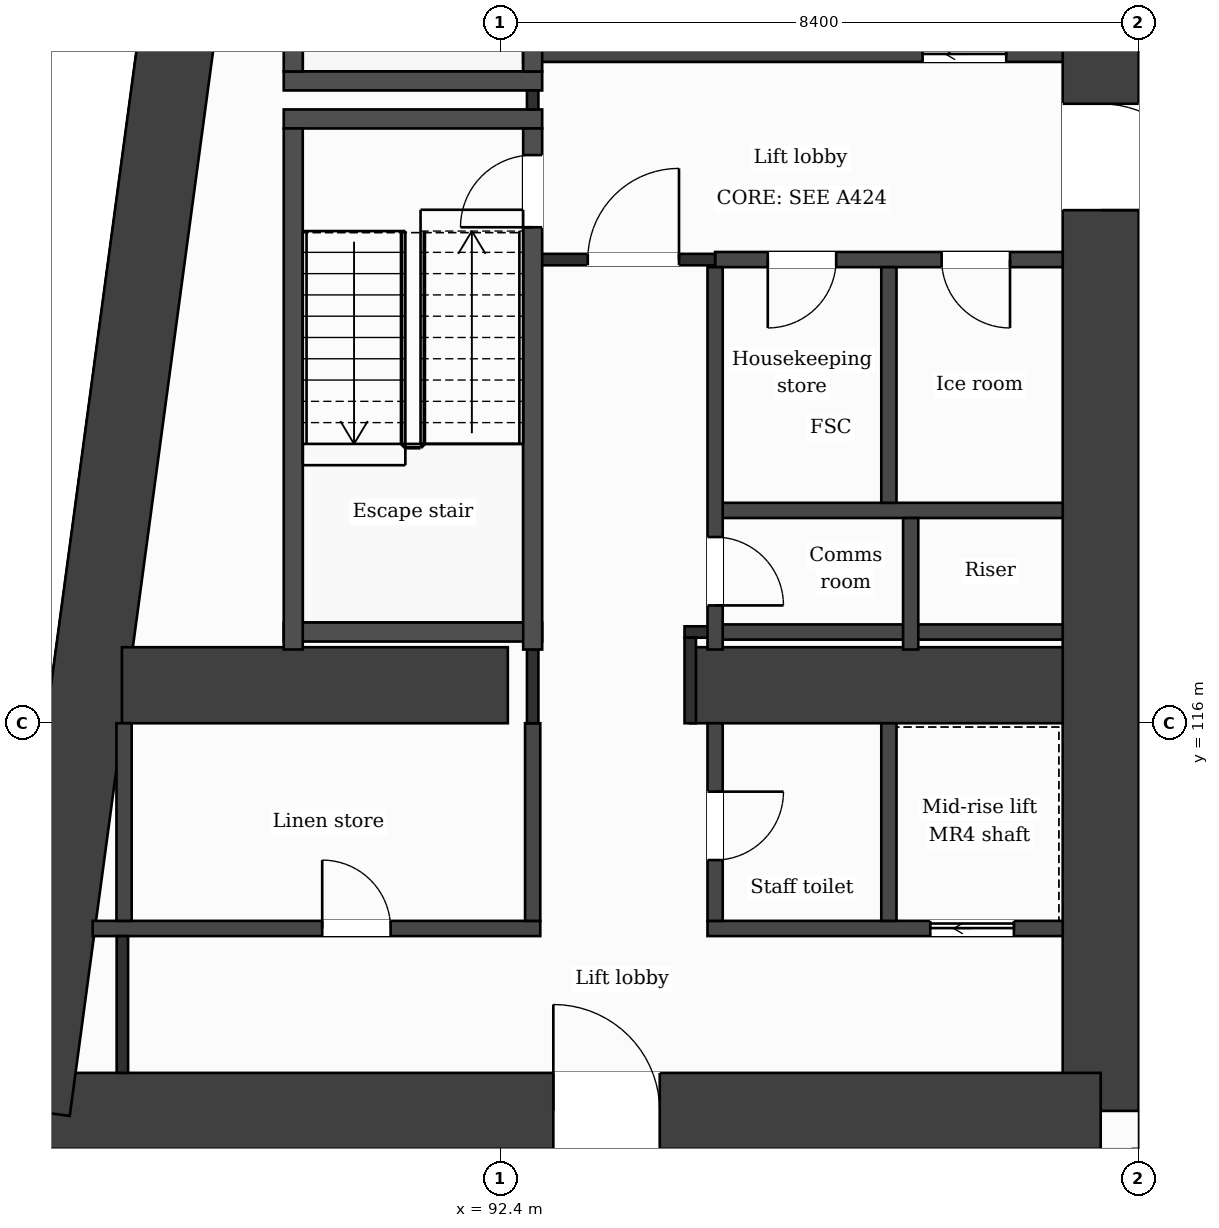
"""IFC4 building model, lengths in metres.
Left out: names, types, materials, properties, quantities, classifications, styles, units other than length and angle.
Written with IfcOpenShell. Run it as: python <this file> out.ifc"""

import sys

from ifc_helpers import new_model, si_unit, direction, frame, frame_2d, origin, place, context, subcontext, project, spatial, rectangle, extrude, element, fill, save


model = new_model("IFC4")
c1 = context("Model", 3, precision=1e-05, world=origin(), true_north=direction((0.0, 1.0)))
c2 = subcontext(c1, "Body", "Model", "MODEL_VIEW")
j1 = project(units=[si_unit("LENGTHUNIT", "METRE"), si_unit("PLANEANGLEUNIT", "RADIAN")], contexts=[c1])
p1 = place(None, origin())
s1 = spatial("IfcSite", under=j1, at=p1, CompositionType="ELEMENT")
p2 = place(p1, origin())
s2 = spatial("IfcBuilding", under=s1, at=p2, CompositionType="ELEMENT")
p3 = place(p2, frame((0.0, 0.0, 102.1)))
s3 = spatial("IfcBuildingStorey", under=s2, at=p3, CompositionType="ELEMENT", Elevation=102.1)
p4 = place(p3, frame((100.3, 131.9, 0.0), z_axis=(0.0, 0.0, 1.0), x_axis=(0.0, -1.0, 0.0)))
e1 = element("IfcWall", 1, at=p4, inside=s3, PredefinedType="SHEAR", context=c2, shape_type="SweptSolid", body=[
    extrude(rectangle(XDim=21.0, YDim=1.0, at=frame_2d((10.5, 0.0))), origin(), (0.0, 0.0, 1.0), 3.7),
])
p5 = place(p4, frame((7.75, 0.0, 0.0)))
e2 = element("IfcOpeningElement", 2, at=p5, cuts=e1, PredefinedType="OPENING", context=c2, shape_type="SweptSolid", body=[
    extrude(rectangle(XDim=1.4, YDim=2.1, at=frame_2d((0.7, 1.05))), frame((0.0, 0.51, 0.0), z_axis=(0.0, -1.0, 0.0), x_axis=(1.0, 0.0, 0.0)), (0.0, 0.0, 1.0), 1.02),
])
p6 = place(p3, frame((100.3, 110.9, 0.0), z_axis=(0.0, 0.0, 1.0), x_axis=(-1.0, 0.0, 0.0)))
e3 = element("IfcWall", 3, at=p6, inside=s3, PredefinedType="SHEAR", context=c2, shape_type="SweptSolid", body=[
    extrude(rectangle(XDim=14.059, YDim=1.0, at=frame_2d((7.03, 0.0))), origin(), (0.0, 0.0, 1.0), 3.7),
])
p7 = place(p6, frame((5.802, 0.0, 0.0)))
e4 = element("IfcOpeningElement", 4, at=p7, cuts=e3, PredefinedType="OPENING", context=c2, shape_type="SweptSolid", body=[
    extrude(rectangle(XDim=1.4, YDim=2.1, at=frame_2d((0.7, 1.05))), frame((0.0, 0.51, 0.0), z_axis=(0.0, -1.0, 0.0), x_axis=(1.0, 0.0, 0.0)), (0.0, 0.0, 1.0), 1.02),
])
p8 = place(p3, frame((86.241, 110.9, 0.0), z_axis=(0.0, 0.0, 1.0), x_axis=(0.133411141623, 0.991060778808, 0.0)))
e5 = element("IfcWall", 5, at=p8, inside=s3, PredefinedType="SHEAR", context=c2, shape_type="SweptSolid", body=[
    extrude(rectangle(XDim=21.189, YDim=1.0, at=frame_2d((10.595, 0.0))), origin(), (0.0, 0.0, 1.0), 3.7),
])
p9 = place(p3, frame((87.423, 116.5, 0.0), z_axis=(0.0, 0.0, 1.0), x_axis=(1.0, 0.0, 0.0)))
e6 = element("IfcWall", 6, at=p9, inside=s3, PredefinedType="SHEAR", context=c2, shape_type="SweptSolid", body=[
    extrude(rectangle(XDim=5.077, YDim=1.0, at=frame_2d((2.539, 0.0))), origin(), (0.0, 0.0, 1.0), 3.7),
])
p10 = place(p3, frame((94.9, 116.5, 0.0), z_axis=(0.0, 0.0, 1.0), x_axis=(1.0, 0.0, 0.0)))
e7 = element("IfcWall", 7, at=p10, inside=s3, PredefinedType="SHEAR", context=c2, shape_type="SweptSolid", body=[
    extrude(rectangle(XDim=4.9, YDim=1.0, at=frame_2d((2.45, 0.0))), origin(), (0.0, 0.0, 1.0), 3.7),
])
p11 = place(p3, frame((87.334, 110.4, 0.0), z_axis=(0.0, 0.0, 1.0), x_axis=(-0.133437175554, -0.991057273915, 0.0)))
e8 = element("IfcWall", 8, at=p11, inside=s3, PredefinedType="SOLIDWALL", context=c2, shape_type="SweptSolid", body=[
    extrude(rectangle(XDim=6.781, YDim=0.3, at=frame_2d((3.39, 0.0))), origin(), (0.0, 0.0, 1.0), 3.38),
])
p12 = place(p11, frame((1.418, 0.0, 0.0)))
e9 = element("IfcOpeningElement", 9, at=p12, cuts=e8, PredefinedType="OPENING", context=c2, shape_type="SweptSolid", body=[
    extrude(rectangle(XDim=1.2, YDim=2.4, at=frame_2d((0.6, 1.2))), frame((0.0, 0.16, 0.0), z_axis=(0.0, -1.0, 0.0), x_axis=(1.0, 0.0, 0.0)), (0.0, 0.0, 1.0), 0.32),
])
p13 = place(p11, frame((4.758, 0.0, 0.9)))
e10 = element("IfcOpeningElement", 10, at=p13, cuts=e8, PredefinedType="OPENING", context=c2, shape_type="SweptSolid", body=[
    extrude(rectangle(XDim=1.2, YDim=2.1, at=frame_2d((0.6, 1.05))), frame((0.0, 0.16, 0.0), z_axis=(0.0, -1.0, 0.0), x_axis=(1.0, 0.0, 0.0)), (0.0, 0.0, 1.0), 0.32),
])
p14 = place(p3, frame((87.039, 113.3, 0.0), z_axis=(0.0, 0.0, 1.0), x_axis=(1.0, 0.0, 0.0)))
e11 = element("IfcWall", 11, at=p14, inside=s3, PredefinedType="PARTITIONING", context=c2, shape_type="SweptSolid", body=[
    extrude(rectangle(XDim=5.888, YDim=0.2, at=frame_2d((2.944, 0.0))), origin(), (0.0, 0.0, 1.0), 3.38),
])
p15 = place(p14, frame((3.019, 0.0, 0.0)))
e12 = element("IfcOpeningElement", 12, at=p15, cuts=e11, PredefinedType="OPENING", context=c2, shape_type="SweptSolid", body=[
    extrude(rectangle(XDim=0.9, YDim=2.1, at=frame_2d((0.45, 1.05))), frame((0.0, 0.11, 0.0), z_axis=(0.0, -1.0, 0.0), x_axis=(1.0, 0.0, 0.0)), (0.0, 0.0, 1.0), 0.22),
])
p16 = place(p3, frame((95.127, 113.3, 0.0), z_axis=(0.0, 0.0, 1.0), x_axis=(1.0, 0.0, 0.0)))
e13 = element("IfcWall", 13, at=p16, inside=s3, PredefinedType="PARTITIONING", context=c2, shape_type="SweptSolid", body=[
    extrude(rectangle(XDim=4.673, YDim=0.2, at=frame_2d((2.336, 0.0))), origin(), (0.0, 0.0, 1.0), 3.38),
])
p17 = place(p16, frame((2.931, 0.0, 0.0)))
e14 = element("IfcOpeningElement", 14, at=p17, cuts=e13, PredefinedType="OPENING", context=c2, shape_type="SweptSolid", body=[
    extrude(rectangle(XDim=1.1, YDim=2.1, at=frame_2d((0.55, 1.05))), frame((0.0, 0.11, 0.0), z_axis=(0.0, -1.0, 0.0), x_axis=(1.0, 0.0, 0.0)), (0.0, 0.0, 1.0), 0.22),
])
p18 = place(p3, frame((95.227, 117.2, 0.0), z_axis=(0.0, 0.0, 1.0), x_axis=(1.0, 0.0, 0.0)))
e15 = element("IfcWall", 15, at=p18, inside=s3, PredefinedType="PARTITIONING", context=c2, shape_type="SweptSolid", body=[
    extrude(rectangle(XDim=4.573, YDim=0.2, at=frame_2d((2.287, 0.0))), origin(), (0.0, 0.0, 1.0), 3.38),
])
p19 = place(p3, frame((94.825, 117.2, 0.0), z_axis=(0.0, 0.0, 1.0), x_axis=(1.0, 0.0, 0.0)))
e16 = element("IfcWall", 16, at=p19, inside=s3, PredefinedType="PARTITIONING", context=c2, shape_type="SweptSolid", body=[
    extrude(rectangle(XDim=0.402, YDim=0.15, at=frame_2d((0.201, 0.0))), origin(), (0.0, 0.0, 1.0), 3.38),
])
p20 = place(p3, frame((89.552, 117.2, 0.0), z_axis=(0.0, 0.0, 1.0), x_axis=(1.0, 0.0, 0.0)))
e17 = element("IfcWall", 17, at=p20, inside=s3, PredefinedType="PARTITIONING", context=c2, shape_type="SweptSolid", body=[
    extrude(rectangle(XDim=3.4, YDim=0.25, at=frame_2d((1.7, 0.0))), origin(), (0.0, 0.0, 1.0), 3.38),
])
p21 = place(p3, frame((95.227, 118.8, 0.0), z_axis=(0.0, 0.0, 1.0), x_axis=(1.0, 0.0, 0.0)))
e18 = element("IfcWall", 18, at=p21, inside=s3, PredefinedType="PARTITIONING", context=c2, shape_type="SweptSolid", body=[
    extrude(rectangle(XDim=4.573, YDim=0.2, at=frame_2d((2.287, 0.0))), origin(), (0.0, 0.0, 1.0), 3.38),
])
p22 = place(p3, frame((95.227, 122.1, 0.0), z_axis=(0.0, 0.0, 1.0), x_axis=(1.0, 0.0, 0.0)))
e19 = element("IfcWall", 19, at=p22, inside=s3, PredefinedType="PARTITIONING", context=c2, shape_type="SweptSolid", body=[
    extrude(rectangle(XDim=4.573, YDim=0.2, at=frame_2d((2.287, 0.0))), origin(), (0.0, 0.0, 1.0), 3.38),
])
p23 = place(p22, frame((0.693, 0.0, 0.0)))
e20 = element("IfcOpeningElement", 20, at=p23, cuts=e19, PredefinedType="OPENING", context=c2, shape_type="SweptSolid", body=[
    extrude(rectangle(XDim=0.9, YDim=2.1, at=frame_2d((0.45, 1.05))), frame((0.0, 0.11, 0.0), z_axis=(0.0, -1.0, 0.0), x_axis=(1.0, 0.0, 0.0)), (0.0, 0.0, 1.0), 0.22),
])
p24 = place(p22, frame((2.98, 0.0, 0.0)))
e21 = element("IfcOpeningElement", 21, at=p24, cuts=e19, PredefinedType="OPENING", context=c2, shape_type="SweptSolid", body=[
    extrude(rectangle(XDim=0.9, YDim=2.1, at=frame_2d((0.45, 1.05))), frame((0.0, 0.11, 0.0), z_axis=(0.0, -1.0, 0.0), x_axis=(1.0, 0.0, 0.0)), (0.0, 0.0, 1.0), 0.22),
])
p25 = place(p3, frame((92.827, 122.1, 0.0), z_axis=(0.0, 0.0, 1.0), x_axis=(1.0, 0.0, 0.0)))
e22 = element("IfcWall", 22, at=p25, inside=s3, PredefinedType="PARTITIONING", context=c2, shape_type="SweptSolid", body=[
    extrude(rectangle(XDim=2.4, YDim=0.15, at=frame_2d((1.2, 0.0))), origin(), (0.0, 0.0, 1.0), 3.38),
])
p26 = place(p25, frame((0.725, 0.0, 0.0)))
e23 = element("IfcOpeningElement", 23, at=p26, cuts=e22, PredefinedType="OPENING", context=c2, shape_type="SweptSolid", body=[
    extrude(rectangle(XDim=1.2, YDim=2.1, at=frame_2d((0.6, 1.05))), frame((0.0, 0.085, 0.0), z_axis=(0.0, -1.0, 0.0), x_axis=(1.0, 0.0, 0.0)), (0.0, 0.0, 1.0), 0.17),
])
for number, where, z_axis, x_axis in (
    (24, (89.552, 123.95, 0.0), (0.0, 0.0, 1.0), (1.0, 0.0, 0.0)),
    (25, (89.552, 124.45, 0.0), (0.0, 0.0, 1.0), (1.0, 0.0, 0.0)),
):
    element("IfcWall", number, at=place(p3, frame(where, z_axis=z_axis, x_axis=x_axis)), inside=s3, PredefinedType="PARTITIONING", context=c2, shape_type="SweptSolid", body=[
        extrude(rectangle(XDim=3.4, YDim=0.25, at=frame_2d((1.7, 0.0))), origin(), (0.0, 0.0, 1.0), 3.38),
    ])
p27 = place(p3, frame((92.702, 124.8, 0.0), z_axis=(0.0, 0.0, 1.0), x_axis=(1.0, 0.0, 0.0)))
e26 = element("IfcWall", 26, at=p27, inside=s3, PredefinedType="PARTITIONING", context=c2, shape_type="SweptSolid", body=[
    extrude(rectangle(XDim=7.098, YDim=0.2, at=frame_2d((3.549, 0.0))), origin(), (0.0, 0.0, 1.0), 3.38),
])
p28 = place(p27, frame((5.255, 0.0, 0.0)))
e27 = element("IfcOpeningElement", 27, at=p28, cuts=e26, PredefinedType="OPENING", context=c2, shape_type="SweptSolid", body=[
    extrude(rectangle(XDim=1.1, YDim=2.1, at=frame_2d((0.55, 1.05))), frame((0.0, 0.11, 0.0), z_axis=(0.0, -1.0, 0.0), x_axis=(1.0, 0.0, 0.0)), (0.0, 0.0, 1.0), 0.22),
])
p29 = place(p3, frame((87.451, 113.4, 0.0), z_axis=(0.0, 0.0, 1.0), x_axis=(0.0, 1.0, 0.0)))
e28 = element("IfcWall", 28, at=p29, inside=s3, PredefinedType="PARTITIONING", context=c2, shape_type="SweptSolid", body=[
    extrude(rectangle(XDim=2.6, YDim=0.2, at=frame_2d((1.3, 0.0))), origin(), (0.0, 0.0, 1.0), 3.38),
])
p30 = place(p3, frame((87.429, 111.4, 0.0), z_axis=(0.0, 0.0, 1.0), x_axis=(0.0, 1.0, 0.0)))
e29 = element("IfcWall", 29, at=p30, inside=s3, PredefinedType="PARTITIONING", context=c2, shape_type="SweptSolid", body=[
    extrude(rectangle(XDim=1.8, YDim=0.15, at=frame_2d((0.9, 0.0))), origin(), (0.0, 0.0, 1.0), 3.38),
])
for number, where, z_axis, x_axis in (
    (30, (89.677, 116.97, 0.0), (0.0, 0.0, 1.0), (0.0, 1.0, 0.0)),
    (31, (89.677, 124.575, 0.0), (0.0, 0.0, 1.0), (0.0, 1.0, 0.0)),
):
    element("IfcWall", number, at=place(p3, frame(where, z_axis=z_axis, x_axis=x_axis)), inside=s3, PredefinedType="PARTITIONING", context=c2, shape_type="SweptSolid", body=[
        extrude(rectangle(XDim=6.855, YDim=0.25, at=frame_2d((3.427, 0.0))), origin(), (0.0, 0.0, 1.0), 3.38),
    ])
p31 = place(p3, frame((92.827, 113.4, 0.0), z_axis=(0.0, 0.0, 1.0), x_axis=(0.0, 1.0, 0.0)))
e32 = element("IfcWall", 32, at=p31, inside=s3, PredefinedType="PARTITIONING", context=c2, shape_type="SweptSolid", body=[
    extrude(rectangle(XDim=2.6, YDim=0.2, at=frame_2d((1.3, 0.0))), origin(), (0.0, 0.0, 1.0), 3.38),
])
p32 = place(p3, frame((92.827, 116.0, 0.0), z_axis=(0.0, 0.0, 1.0), x_axis=(0.0, 1.0, 0.0)))
e33 = element("IfcWall", 33, at=p32, inside=s3, PredefinedType="PARTITIONING", context=c2, shape_type="SweptSolid", body=[
    extrude(rectangle(XDim=0.97, YDim=0.15, at=frame_2d((0.485, 0.0))), origin(), (0.0, 0.0, 1.0), 3.38),
])
p33 = place(p3, frame((92.827, 124.075, 0.0), z_axis=(0.0, 0.0, 1.0), x_axis=(0.0, 1.0, 0.0)))
e34 = element("IfcWall", 34, at=p33, inside=s3, PredefinedType="PARTITIONING", context=c2, shape_type="SweptSolid", body=[
    extrude(rectangle(XDim=0.25, YDim=0.15, at=frame_2d((0.125, 0.0))), origin(), (0.0, 0.0, 1.0), 3.38),
])
p34 = place(p3, frame((92.827, 116.97, 0.0), z_axis=(0.0, 0.0, 1.0), x_axis=(0.0, 1.0, 0.0)))
e35 = element("IfcWall", 35, at=p34, inside=s3, PredefinedType="PARTITIONING", context=c2, shape_type="SweptSolid", body=[
    extrude(rectangle(XDim=6.855, YDim=0.25, at=frame_2d((3.427, 0.0))), origin(), (0.0, 0.0, 1.0), 3.38),
])
p35 = place(p34, frame((5.555, 0.0, 0.0)))
e36 = element("IfcOpeningElement", 36, at=p35, cuts=e35, PredefinedType="OPENING", context=c2, shape_type="SweptSolid", body=[
    extrude(rectangle(XDim=0.95, YDim=2.1, at=frame_2d((0.475, 1.05))), frame((0.0, 0.135, 0.0), z_axis=(0.0, -1.0, 0.0), x_axis=(1.0, 0.0, 0.0)), (0.0, 0.0, 1.0), 0.27),
])
p36 = place(p3, frame((92.827, 124.575, 0.0), z_axis=(0.0, 0.0, 1.0), x_axis=(0.0, 1.0, 0.0)))
e37 = element("IfcWall", 37, at=p36, inside=s3, PredefinedType="PARTITIONING", context=c2, shape_type="SweptSolid", body=[
    extrude(rectangle(XDim=6.855, YDim=0.25, at=frame_2d((3.427, 0.0))), origin(), (0.0, 0.0, 1.0), 3.38),
])
p37 = place(p36, frame((5.325, 0.0, 0.0)))
e38 = element("IfcOpeningElement", 38, at=p37, cuts=e37, PredefinedType="OPENING", context=c2, shape_type="SweptSolid", body=[
    extrude(rectangle(XDim=1.0, YDim=2.1, at=frame_2d((0.5, 1.05))), frame((0.0, 0.135, 0.0), z_axis=(0.0, -1.0, 0.0), x_axis=(1.0, 0.0, 0.0)), (0.0, 0.0, 1.0), 0.27),
])
p38 = place(p3, frame((94.9, 116.0, 0.0), z_axis=(0.0, 0.0, 1.0), x_axis=(0.0, 1.0, 0.0)))
e39 = element("IfcWall", 39, at=p38, inside=s3, PredefinedType="PARTITIONING", context=c2, shape_type="SweptSolid", body=[
    extrude(rectangle(XDim=1.125, YDim=0.15, at=frame_2d((0.562, 0.0))), origin(), (0.0, 0.0, 1.0), 3.38),
])
p39 = place(p3, frame((95.227, 113.4, 0.0), z_axis=(0.0, 0.0, 1.0), x_axis=(0.0, 1.0, 0.0)))
e40 = element("IfcWall", 40, at=p39, inside=s3, PredefinedType="PARTITIONING", context=c2, shape_type="SweptSolid", body=[
    extrude(rectangle(XDim=2.6, YDim=0.2, at=frame_2d((1.3, 0.0))), origin(), (0.0, 0.0, 1.0), 3.38),
])
p40 = place(p39, frame((0.8, 0.0, 0.0)))
e41 = element("IfcOpeningElement", 41, at=p40, cuts=e40, PredefinedType="OPENING", context=c2, shape_type="SweptSolid", body=[
    extrude(rectangle(XDim=0.9, YDim=2.1, at=frame_2d((0.45, 1.05))), frame((0.0, 0.11, 0.0), z_axis=(0.0, -1.0, 0.0), x_axis=(1.0, 0.0, 0.0)), (0.0, 0.0, 1.0), 0.22),
])
p41 = place(p3, frame((95.227, 116.97, 0.0), z_axis=(0.0, 0.0, 1.0), x_axis=(0.0, 1.0, 0.0)))
e42 = element("IfcWall", 42, at=p41, inside=s3, PredefinedType="PARTITIONING", context=c2, shape_type="SweptSolid", body=[
    extrude(rectangle(XDim=5.03, YDim=0.2, at=frame_2d((2.515, 0.0))), origin(), (0.0, 0.0, 1.0), 3.38),
])
p42 = place(p41, frame((0.58, 0.0, 0.0)))
e43 = element("IfcOpeningElement", 43, at=p42, cuts=e42, PredefinedType="OPENING", context=c2, shape_type="SweptSolid", body=[
    extrude(rectangle(XDim=0.9, YDim=2.1, at=frame_2d((0.45, 1.05))), frame((0.0, 0.11, 0.0), z_axis=(0.0, -1.0, 0.0), x_axis=(1.0, 0.0, 0.0)), (0.0, 0.0, 1.0), 0.22),
])
p43 = place(p3, frame((97.513, 113.4, 0.0), z_axis=(0.0, 0.0, 1.0), x_axis=(0.0, 1.0, 0.0)))
e44 = element("IfcWall", 44, at=p43, inside=s3, PredefinedType="PARTITIONING", context=c2, shape_type="SweptSolid", body=[
    extrude(rectangle(XDim=2.6, YDim=0.2, at=frame_2d((1.3, 0.0))), origin(), (0.0, 0.0, 1.0), 3.38),
])
p44 = place(p3, frame((97.513, 118.9, 0.0), z_axis=(0.0, 0.0, 1.0), x_axis=(0.0, 1.0, 0.0)))
e45 = element("IfcWall", 45, at=p44, inside=s3, PredefinedType="PARTITIONING", context=c2, shape_type="SweptSolid", body=[
    extrude(rectangle(XDim=3.1, YDim=0.2, at=frame_2d((1.55, 0.0))), origin(), (0.0, 0.0, 1.0), 3.38),
])
p45 = place(p3, frame((97.8, 116.97, 0.0), z_axis=(0.0, 0.0, 1.0), x_axis=(0.0, 1.0, 0.0)))
e46 = element("IfcWall", 46, at=p45, inside=s3, PredefinedType="PARTITIONING", context=c2, shape_type="SweptSolid", body=[
    extrude(rectangle(XDim=1.73, YDim=0.2, at=frame_2d((0.865, 0.0))), origin(), (0.0, 0.0, 1.0), 3.38),
])
p46 = place(p3, frame((100.8, 109.075, 0.0), z_axis=(0.0, 0.0, 1.0), x_axis=(0.0, 1.0, 0.0)))
e47 = element("IfcWall", 47, at=p46, inside=s3, PredefinedType="PARTITIONING", context=c2, shape_type="SweptSolid", body=[
    extrude(rectangle(XDim=1.325, YDim=0.15, at=frame_2d((0.663, 0.0))), origin(), (0.0, 0.0, 1.0), 3.38),
])
p47 = place(p26, origin())
e48 = element("IfcDoor", 48, at=p47, inside=s3, OperationType="SINGLE_SWING_RIGHT", PredefinedType="DOOR", context=c2, shape_type="SweptSolid", body=[
    extrude(rectangle(XDim=1.2, YDim=2.1, at=frame_2d((0.6, 1.05))), frame((0.0, 0.025, 0.0), z_axis=(0.0, -1.0, 0.0), x_axis=(1.0, 0.0, 0.0)), (0.0, 0.0, 1.0), 0.05),
])
fill(e23, e48)
p48 = place(p28, origin())
e49 = element("IfcDoor", 49, at=p48, inside=s3, OperationType="SLIDING_TO_LEFT", PredefinedType="DOOR", context=c2, shape_type="SweptSolid", body=[
    extrude(rectangle(XDim=1.1, YDim=2.1, at=frame_2d((0.55, 1.05))), frame((0.0, 0.025, 0.0), z_axis=(0.0, -1.0, 0.0), x_axis=(1.0, 0.0, 0.0)), (0.0, 0.0, 1.0), 0.05),
])
fill(e27, e49)
p49 = place(p23, origin())
e50 = element("IfcDoor", 50, at=p49, inside=s3, OperationType="SINGLE_SWING_LEFT", PredefinedType="DOOR", context=c2, shape_type="SweptSolid", body=[
    extrude(rectangle(XDim=0.9, YDim=2.1, at=frame_2d((0.45, 1.05))), frame((0.0, 0.025, 0.0), z_axis=(0.0, -1.0, 0.0), x_axis=(1.0, 0.0, 0.0)), (0.0, 0.0, 1.0), 0.05),
])
fill(e20, e50)
p50 = place(p24, origin())
e51 = element("IfcDoor", 51, at=p50, inside=s3, OperationType="SINGLE_SWING_RIGHT", PredefinedType="DOOR", context=c2, shape_type="SweptSolid", body=[
    extrude(rectangle(XDim=0.9, YDim=2.1, at=frame_2d((0.45, 1.05))), frame((0.0, 0.025, 0.0), z_axis=(0.0, -1.0, 0.0), x_axis=(1.0, 0.0, 0.0)), (0.0, 0.0, 1.0), 0.05),
])
fill(e21, e51)
p51 = place(p35, origin())
e52 = element("IfcDoor", 52, at=p51, inside=s3, OperationType="SINGLE_SWING_LEFT", PredefinedType="DOOR", context=c2, shape_type="SweptSolid", body=[
    extrude(rectangle(XDim=0.95, YDim=2.1, at=frame_2d((0.475, 1.05))), frame((0.0, 0.025, 0.0), z_axis=(0.0, -1.0, 0.0), x_axis=(1.0, 0.0, 0.0)), (0.0, 0.0, 1.0), 0.05),
])
fill(e36, e52)
p52 = place(p42, origin())
e53 = element("IfcDoor", 53, at=p52, inside=s3, OperationType="SINGLE_SWING_LEFT", PredefinedType="DOOR", context=c2, shape_type="SweptSolid", body=[
    extrude(rectangle(XDim=0.9, YDim=2.1, at=frame_2d((0.45, 1.05))), frame((0.0, 0.025, 0.0), z_axis=(0.0, -1.0, 0.0), x_axis=(1.0, 0.0, 0.0)), (0.0, 0.0, 1.0), 0.05),
])
fill(e43, e53)
p53 = place(p17, origin())
e54 = element("IfcDoor", 54, at=p53, inside=s3, OperationType="SLIDING_TO_LEFT", PredefinedType="DOOR", context=c2, shape_type="SweptSolid", body=[
    extrude(rectangle(XDim=1.1, YDim=2.1, at=frame_2d((0.55, 1.05))), frame((0.0, 0.025, 0.0), z_axis=(0.0, -1.0, 0.0), x_axis=(1.0, 0.0, 0.0)), (0.0, 0.0, 1.0), 0.05),
])
fill(e14, e54)
p54 = place(p15, origin())
e55 = element("IfcDoor", 55, at=p54, inside=s3, OperationType="SINGLE_SWING_LEFT", PredefinedType="DOOR", context=c2, shape_type="SweptSolid", body=[
    extrude(rectangle(XDim=0.9, YDim=2.1, at=frame_2d((0.45, 1.05))), frame((0.0, 0.025, 0.0), z_axis=(0.0, -1.0, 0.0), x_axis=(1.0, 0.0, 0.0)), (0.0, 0.0, 1.0), 0.05),
])
fill(e12, e55)
p55 = place(p40, origin())
e56 = element("IfcDoor", 56, at=p55, inside=s3, OperationType="SINGLE_SWING_RIGHT", PredefinedType="DOOR", context=c2, shape_type="SweptSolid", body=[
    extrude(rectangle(XDim=0.9, YDim=2.1, at=frame_2d((0.45, 1.05))), frame((0.0, 0.025, 0.0), z_axis=(0.0, -1.0, 0.0), x_axis=(1.0, 0.0, 0.0)), (0.0, 0.0, 1.0), 0.05),
])
fill(e41, e56)
p56 = place(p7, origin())
e57 = element("IfcDoor", 57, at=p56, inside=s3, OperationType="SINGLE_SWING_RIGHT", PredefinedType="DOOR", context=c2, shape_type="SweptSolid", body=[
    extrude(rectangle(XDim=1.4, YDim=2.1, at=frame_2d((0.7, 1.05))), frame((0.0, 0.025, 0.0), z_axis=(0.0, -1.0, 0.0), x_axis=(1.0, 0.0, 0.0)), (0.0, 0.0, 1.0), 0.05),
])
fill(e4, e57)
p57 = place(p5, origin())
e58 = element("IfcDoor", 58, at=p57, inside=s3, OperationType="SINGLE_SWING_RIGHT", PredefinedType="DOOR", context=c2, shape_type="SweptSolid", body=[
    extrude(rectangle(XDim=1.4, YDim=2.1, at=frame_2d((0.7, 1.05))), frame((0.0, 0.025, 0.0), z_axis=(0.0, -1.0, 0.0), x_axis=(1.0, 0.0, 0.0)), (0.0, 0.0, 1.0), 0.05),
])
fill(e2, e58)
save(model, sys.argv[1])
